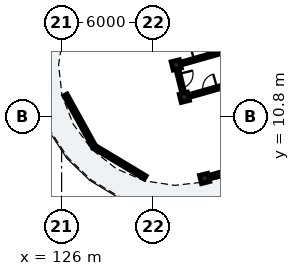
"""IFC4 building model, lengths in metres.
Left out: names, types, materials, properties, quantities, classifications, styles, units other than length and angle.
Written with IfcOpenShell. Run it as: python <this file> out.ifc"""

import sys

from ifc_helpers import new_model, si_unit, direction, frame, frame_2d, origin, origin_2d, place, context, subcontext, project, spatial, rectangle, extrude, element, fill, save


model = new_model("IFC4")
c1 = context("Model", 3, precision=1e-05, world=origin(), true_north=direction((0.0, 1.0)))
c2 = subcontext(c1, "Body", "Model", "MODEL_VIEW")
j1 = project(units=[si_unit("LENGTHUNIT", "METRE"), si_unit("PLANEANGLEUNIT", "RADIAN")], contexts=[c1])
p1 = place(None, origin())
s1 = spatial("IfcSite", under=j1, at=p1, CompositionType="ELEMENT")
p2 = place(p1, origin())
s2 = spatial("IfcBuilding", under=s1, at=p2, CompositionType="ELEMENT")
p3 = place(p2, frame((0.0, 0.0, 12.2)))
s3 = spatial("IfcBuildingStorey", under=s2, at=p3, CompositionType="ELEMENT", Elevation=12.2)
for number, where, z_axis, x_axis in (
    (1, (133.544, 14.19, 0.0), (0.0, 0.0, 1.0), (0.242, -0.97, 0.0)),
    (2, (134.076, 12.055, 0.0), (0.0, 0.0, 1.0), (0.242, -0.97, 0.0)),
    (3, (135.406, 6.719, 0.0), (0.0, 0.0, 1.0), (0.242, -0.97, 0.0)),
):
    element("IfcColumn", number, at=place(p3, frame(where, z_axis=z_axis, x_axis=x_axis)), inside=s3, PredefinedType="COLUMN", context=c2, shape_type="SweptSolid", body=[
        extrude(rectangle(XDim=0.56, YDim=0.56, at=origin_2d()), origin(), (0.0, 0.0, 1.0), 3.105),
    ])
p4 = place(p3, frame((135.647, 6.787, 0.0), z_axis=(0.0, 0.0, 1.0), x_axis=(0.961871954212, 0.2735001713, 0.0)))
e4 = element("IfcWall", 4, at=p4, inside=s3, PredefinedType="SOLIDWALL", context=c2, shape_type="SweptSolid", body=[
    extrude(rectangle(XDim=3.487, YDim=0.24, at=frame_2d((1.743, 0.0))), origin(), (0.0, 0.0, 1.0), 2.355),
])
p5 = place(p4, frame((1.003, 0.0, 0.55)))
e5 = element("IfcOpeningElement", 5, at=p5, cuts=e4, PredefinedType="OPENING", context=c2, shape_type="SweptSolid", body=[
    extrude(rectangle(XDim=1.48, YDim=1.62, at=frame_2d((0.74, 0.81))), frame((0.0, 0.13, 0.0), z_axis=(0.0, -1.0, 0.0), x_axis=(1.0, 0.0, 0.0)), (0.0, 0.0, 1.0), 0.26),
])
p6 = place(p3, frame((131.499, 6.787, 0.0), z_axis=(0.0, 0.0, 1.0), x_axis=(-0.85715098885, 0.515065221417, 0.0)))
e6 = element("IfcWall", 6, at=p6, inside=s3, PredefinedType="SOLIDWALL", context=c2, shape_type="SweptSolid", body=[
    extrude(rectangle(XDim=3.908, YDim=0.24, at=frame_2d((1.954, 0.0))), origin(), (0.0, 0.0, 1.0), 2.355),
])
p7 = place(p6, frame((0.979, 0.0, 0.4)))
e7 = element("IfcOpeningElement", 7, at=p7, cuts=e6, PredefinedType="OPENING", context=c2, shape_type="SweptSolid", body=[
    extrude(rectangle(XDim=1.95, YDim=1.78, at=frame_2d((0.975, 0.89))), frame((0.0, 0.13, 0.0), z_axis=(0.0, -1.0, 0.0), x_axis=(1.0, 0.0, 0.0)), (0.0, 0.0, 1.0), 0.26),
])
p8 = place(p3, frame((128.149, 8.8, 0.0), z_axis=(0.0, 0.0, 1.0), x_axis=(-0.484841794757, 0.874601871743, 0.0)))
e8 = element("IfcWall", 8, at=p8, inside=s3, PredefinedType="SOLIDWALL", context=c2, shape_type="SweptSolid", body=[
    extrude(rectangle(XDim=3.908, YDim=0.24, at=frame_2d((1.954, 0.0))), origin(), (0.0, 0.0, 1.0), 2.355),
])
p9 = place(p3, frame((134.413, 12.151, 0.0), z_axis=(0.0, 0.0, 1.0), x_axis=(0.961873892319, 0.273493355085, 0.0)))
e9 = element("IfcWall", 9, at=p9, inside=s3, PredefinedType="PARTITIONING", context=c2, shape_type="SweptSolid", body=[
    extrude(rectangle(XDim=2.837, YDim=0.195, at=frame_2d((1.418, 0.0))), origin(), (0.0, 0.0, 1.0), 2.37),
])
p10 = place(p9, frame((0.944, 0.0, 0.0)))
e10 = element("IfcOpeningElement", 10, at=p10, cuts=e9, PredefinedType="OPENING", context=c2, shape_type="SweptSolid", body=[
    extrude(rectangle(XDim=0.95, YDim=2.13, at=frame_2d((0.475, 1.065))), frame((0.0, 0.107, 0.0), z_axis=(0.0, -1.0, 0.0), x_axis=(1.0, 0.0, 0.0)), (0.0, 0.0, 1.0), 0.215),
])
p11 = place(p3, frame((133.88, 14.286, 0.0), z_axis=(0.0, 0.0, 1.0), x_axis=(0.961861926514, 0.273535435224, 0.0)))
e11 = element("IfcWall", 11, at=p11, inside=s3, PredefinedType="PARTITIONING", context=c2, shape_type="SweptSolid", body=[
    extrude(rectangle(XDim=2.693, YDim=0.195, at=frame_2d((1.346, 0.0))), origin(), (0.0, 0.0, 1.0), 2.37),
])
p12 = place(p11, frame((0.872, 0.0, 0.0)))
e12 = element("IfcOpeningElement", 12, at=p12, cuts=e11, PredefinedType="OPENING", context=c2, shape_type="SweptSolid", body=[
    extrude(rectangle(XDim=0.95, YDim=2.13, at=frame_2d((0.475, 1.065))), frame((0.0, 0.107, 0.0), z_axis=(0.0, -1.0, 0.0), x_axis=(1.0, 0.0, 0.0)), (0.0, 0.0, 1.0), 0.215),
])
p13 = place(p3, frame((133.556, 14.142, 0.0), z_axis=(0.0, 0.0, 1.0), x_axis=(0.241933770084, -0.970292765557, 0.0)))
e13 = element("IfcWall", 13, at=p13, inside=s3, PredefinedType="PARTITIONING", context=c2, shape_type="SweptSolid", body=[
    extrude(rectangle(XDim=2.1, YDim=0.195, at=frame_2d((1.05, 0.0))), origin(), (0.0, 0.0, 1.0), 2.37),
])
p14 = place(p13, frame((0.57, 0.0, 0.0)))
e14 = element("IfcOpeningElement", 14, at=p14, cuts=e13, PredefinedType="OPENING", context=c2, shape_type="SweptSolid", body=[
    extrude(rectangle(XDim=0.95, YDim=2.13, at=frame_2d((0.475, 1.065))), frame((0.0, 0.107, 0.0), z_axis=(0.0, -1.0, 0.0), x_axis=(1.0, 0.0, 0.0)), (0.0, 0.0, 1.0), 0.215),
])
p15 = place(p7, origin())
e15 = element("IfcWindow", 15, at=p15, inside=s3, PartitioningType="SINGLE_PANEL", PredefinedType="WINDOW", context=c2, shape_type="SweptSolid", body=[
    extrude(rectangle(XDim=1.95, YDim=1.78, at=frame_2d((0.975, 0.89))), frame((0.0, 0.03, 0.0), z_axis=(0.0, -1.0, 0.0), x_axis=(1.0, 0.0, 0.0)), (0.0, 0.0, 1.0), 0.06),
])
fill(e7, e15)
p16 = place(p10, origin())
e16 = element("IfcDoor", 16, at=p16, inside=s3, OperationType="SINGLE_SWING_RIGHT", PredefinedType="DOOR", context=c2, shape_type="SweptSolid", body=[
    extrude(rectangle(XDim=0.95, YDim=2.13, at=frame_2d((0.475, 1.065))), frame((0.0, 0.025, 0.0), z_axis=(0.0, -1.0, 0.0), x_axis=(1.0, 0.0, 0.0)), (0.0, 0.0, 1.0), 0.05),
])
fill(e10, e16)
p17 = place(p12, origin())
e17 = element("IfcDoor", 17, at=p17, inside=s3, OperationType="SINGLE_SWING_LEFT", PredefinedType="DOOR", context=c2, shape_type="SweptSolid", body=[
    extrude(rectangle(XDim=0.95, YDim=2.13, at=frame_2d((0.475, 1.065))), frame((0.0, 0.025, 0.0), z_axis=(0.0, -1.0, 0.0), x_axis=(1.0, 0.0, 0.0)), (0.0, 0.0, 1.0), 0.05),
])
fill(e12, e17)
p18 = place(p14, origin())
e18 = element("IfcDoor", 18, at=p18, inside=s3, OperationType="SINGLE_SWING_LEFT", PredefinedType="DOOR", context=c2, shape_type="SweptSolid", body=[
    extrude(rectangle(XDim=0.95, YDim=2.13, at=frame_2d((0.475, 1.065))), frame((0.0, 0.025, 0.0), z_axis=(0.0, -1.0, 0.0), x_axis=(1.0, 0.0, 0.0)), (0.0, 0.0, 1.0), 0.05),
])
fill(e14, e18)
save(model, sys.argv[1])
